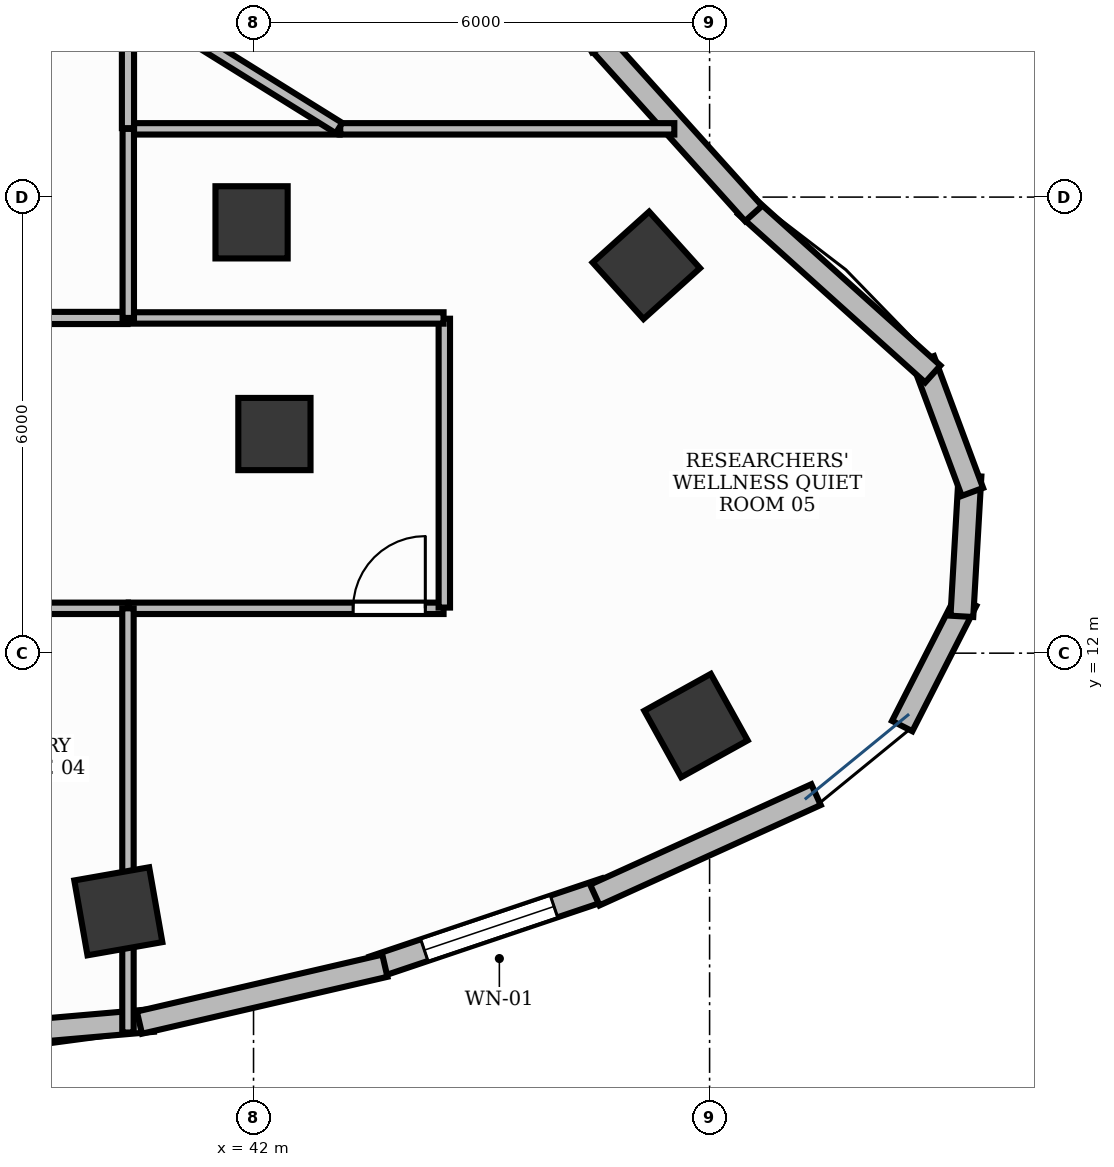
"""IFC4 building model, lengths in metres.
Left out: names, types, materials, properties, quantities, classifications, styles, units other than length and angle.
Written with IfcOpenShell. Run it as: python <this file> out.ifc"""

import sys

from ifc_helpers import new_model, si_unit, direction, frame, frame_2d, origin, origin_2d, place, context, subcontext, project, spatial, rectangle, extrude, element, fill, save


model = new_model("IFC4")
c1 = context("Model", 3, precision=1e-05, world=origin(), true_north=direction((0.0, 1.0)))
c2 = subcontext(c1, "Body", "Model", "MODEL_VIEW")
j1 = project(units=[si_unit("LENGTHUNIT", "METRE"), si_unit("PLANEANGLEUNIT", "RADIAN")], contexts=[c1])
p1 = place(None, origin())
s1 = spatial("IfcSite", under=j1, at=p1, CompositionType="ELEMENT")
p2 = place(p1, origin())
s2 = spatial("IfcBuilding", under=s1, at=p2, CompositionType="ELEMENT")
p3 = place(p2, frame((0.0, 0.0, 196.2)))
s3 = spatial("IfcBuildingStorey", under=s2, at=p3, CompositionType="ELEMENT", Elevation=196.2)
for number, where, z_axis, x_axis in (
    (1, (40.221, 8.604, -0.0), (0.0, 0.0, 1.0), (0.985, 0.173, 0.0)),
    (2, (47.821, 11.047, -0.0), (0.0, 0.0, 1.0), (0.875, 0.485, 0.0)),
):
    element("IfcColumn", number, at=place(p3, frame(where, z_axis=z_axis, x_axis=x_axis)), inside=s3, PredefinedType="COLUMN", context=c2, shape_type="SweptSolid", body=[
        extrude(rectangle(XDim=1.0, YDim=1.0, at=origin_2d()), origin(), (0.0, 0.0, 1.0), 3.901),
    ])
p4 = place(p3, frame((42.275, 14.883, -0.0), z_axis=(0.0, 0.0, 1.0), x_axis=(1.0, 0.0, 0.0)))
e3 = element("IfcColumn", 3, at=p4, inside=s3, PredefinedType="COLUMN", context=c2, shape_type="SweptSolid", body=[
    extrude(rectangle(XDim=0.95, YDim=0.95, at=origin_2d()), origin(), (0.0, 0.0, 1.0), 3.901),
])
p5 = place(p3, frame((47.167, 17.102, -0.0), z_axis=(0.0, 0.0, 1.0), x_axis=(-0.669130606359, 0.743144825477, 0.0)))
e4 = element("IfcColumn", 4, at=p5, inside=s3, PredefinedType="COLUMN", context=c2, shape_type="SweptSolid", body=[
    extrude(rectangle(XDim=1.0, YDim=1.0, at=origin_2d()), origin(), (0.0, 0.0, 1.0), 3.901),
])
p6 = place(p3, frame((41.974, 17.668, -0.0), z_axis=(0.0, 0.0, 1.0), x_axis=(1.0, 0.0, 0.0)))
e5 = element("IfcColumn", 5, at=p6, inside=s3, PredefinedType="COLUMN", context=c2, shape_type="SweptSolid", body=[
    extrude(rectangle(XDim=0.95, YDim=0.95, at=origin_2d()), origin(), (0.0, 0.0, 1.0), 3.901),
])
p7 = place(p3, frame((43.573, 7.866, 0.0), z_axis=(0.0, 0.0, 1.0), x_axis=(0.947663163736, 0.319271871761, 0.0)))
e6 = element("IfcWall", 6, at=p7, inside=s3, PredefinedType="STANDARD", context=c2, shape_type="SweptSolid", body=[
    extrude(rectangle(XDim=3.222, YDim=0.3, at=frame_2d((1.611, 0.0))), origin(), (0.0, 0.0, 1.0), 3.9),
])
p8 = place(p7, frame((0.711, 0.0, 0.9)))
e7 = element("IfcOpeningElement", 7, at=p8, cuts=e6, PredefinedType="OPENING", context=c2, shape_type="SweptSolid", body=[
    extrude(rectangle(XDim=1.8, YDim=2.1, at=frame_2d((0.9, 1.05))), frame((0.0, 0.165, 0.0), z_axis=(0.0, -1.0, 0.0), x_axis=(1.0, 0.0, 0.0)), (0.0, 0.0, 1.0), 0.33),
])
p9 = place(p3, frame((34.149, 6.601, 0.0), z_axis=(0.0, 0.0, 1.0), x_axis=(0.996255675021, 0.086455942472, 0.0)))
e8 = element("IfcWall", 8, at=p9, inside=s3, PredefinedType="STANDARD", context=c2, shape_type="SweptSolid", body=[
    extrude(rectangle(XDim=6.551, YDim=0.3, at=frame_2d((3.276, 0.0))), origin(), (0.0, 0.0, 1.0), 3.9),
])
p10 = place(p3, frame((40.499, 7.14, 0.0), z_axis=(0.0, 0.0, 1.0), x_axis=(0.974179712493, 0.225773974956, 0.0)))
e9 = element("IfcWall", 9, at=p10, inside=s3, PredefinedType="STANDARD", context=c2, shape_type="SweptSolid", body=[
    extrude(rectangle(XDim=3.314, YDim=0.3, at=frame_2d((1.657, 0.0))), origin(), (0.0, 0.0, 1.0), 3.9),
])
p11 = place(p3, frame((46.49, 8.818, 0.0), z_axis=(0.0, 0.0, 1.0), x_axis=(0.910633193525, 0.413215666268, 0.0)))
e10 = element("IfcWall", 10, at=p11, inside=s3, PredefinedType="STANDARD", context=c2, shape_type="SweptSolid", body=[
    extrude(rectangle(XDim=3.195, YDim=0.3, at=frame_2d((1.598, 0.0))), origin(), (0.0, 0.0, 1.0), 3.9),
])
for number, where, z_axis, x_axis in (
    (11, (50.534, 11.041, 0.0), (0.0, 0.0, 1.0), (0.454, 0.891, 0.0)),
    (12, (51.319, 12.484, 0.0), (0.0, 0.0, 1.0), (0.057, 0.998, 0.0)),
    (13, (51.458, 14.121, 0.0), (0.0, 0.0, 1.0), (-0.349, 0.937, 0.0)),
):
    element("IfcWall", number, at=place(p3, frame(where, z_axis=z_axis, x_axis=x_axis)), inside=s3, PredefinedType="STANDARD", context=c2, shape_type="SweptSolid", body=[
        extrude(rectangle(XDim=1.852, YDim=0.3, at=frame_2d((0.926, 0.0))), origin(), (0.0, 0.0, 1.0), 3.9),
    ])
p12 = place(p3, frame((50.936, 15.673, 0.0), z_axis=(0.0, 0.0, 1.0), x_axis=(-0.743341827472, 0.668911748687, 0.0)))
e14 = element("IfcWall", 14, at=p12, inside=s3, PredefinedType="STANDARD", context=c2, shape_type="SweptSolid", body=[
    extrude(rectangle(XDim=3.31, YDim=0.3, at=frame_2d((1.655, 0.0))), origin(), (0.0, 0.0, 1.0), 3.9),
])
p13 = place(p3, frame((48.579, 17.784, 0.0), z_axis=(0.0, 0.0, 1.0), x_axis=(-0.669165704933, 0.743113221079, 0.0)))
e15 = element("IfcWall", 15, at=p13, inside=s3, PredefinedType="STANDARD", context=c2, shape_type="SweptSolid", body=[
    extrude(rectangle(XDim=3.087, YDim=0.3, at=frame_2d((1.543, 0.0))), origin(), (0.0, 0.0, 1.0), 3.9),
])
p14 = place(p3, frame((35.98, 12.59, 0.0), z_axis=(0.0, 0.0, 1.0), x_axis=(1.0, 0.0, 0.0)))
e16 = element("IfcWall", 16, at=p14, inside=s3, PredefinedType="PARTITIONING", context=c2, shape_type="SweptSolid", body=[
    extrude(rectangle(XDim=4.368, YDim=0.15, at=frame_2d((2.184, 0.0))), origin(), (0.0, 0.0, 1.0), 2.22),
])
p15 = place(p14, frame((0.508, 0.0, 0.0)))
e17 = element("IfcOpeningElement", 17, at=p15, cuts=e16, PredefinedType="OPENING", context=c2, shape_type="SweptSolid", body=[
    extrude(rectangle(XDim=0.95, YDim=2.15, at=frame_2d((0.475, 1.075))), frame((0.0, 0.09, 0.0), z_axis=(0.0, -1.0, 0.0), x_axis=(1.0, 0.0, 0.0)), (0.0, 0.0, 1.0), 0.18),
])
p16 = place(p3, frame((40.358, 12.59, 0.0), z_axis=(0.0, 0.0, 1.0), x_axis=(1.0, 0.0, 0.0)))
e18 = element("IfcWall", 18, at=p16, inside=s3, PredefinedType="PARTITIONING", context=c2, shape_type="SweptSolid", body=[
    extrude(rectangle(XDim=4.142, YDim=0.15, at=frame_2d((2.071, 0.0))), origin(), (0.0, 0.0, 1.0), 2.22),
])
p17 = place(p16, frame((2.952, 0.0, 0.0)))
e19 = element("IfcOpeningElement", 19, at=p17, cuts=e18, PredefinedType="OPENING", context=c2, shape_type="SweptSolid", body=[
    extrude(rectangle(XDim=0.95, YDim=2.15, at=frame_2d((0.475, 1.075))), frame((0.0, 0.09, 0.0), z_axis=(0.0, -1.0, 0.0), x_axis=(1.0, 0.0, 0.0)), (0.0, 0.0, 1.0), 0.18),
])
p18 = place(p3, frame((40.342, 16.41, 0.0), z_axis=(0.0, 0.0, 1.0), x_axis=(-1.0, 0.0, 0.0)))
e20 = element("IfcWall", 20, at=p18, inside=s3, PredefinedType="PARTITIONING", context=c2, shape_type="SweptSolid", body=[
    extrude(rectangle(XDim=11.342, YDim=0.16, at=frame_2d((5.671, 0.0))), origin(), (0.0, 0.0, 1.0), 2.22),
])
p19 = place(p18, frame((6.14, 0.0, 0.0)))
e21 = element("IfcOpeningElement", 21, at=p19, cuts=e20, PredefinedType="OPENING", context=c2, shape_type="SweptSolid", body=[
    extrude(rectangle(XDim=0.95, YDim=2.15, at=frame_2d((0.475, 1.075))), frame((0.0, 0.095, 0.0), z_axis=(0.0, -1.0, 0.0), x_axis=(1.0, 0.0, 0.0)), (0.0, 0.0, 1.0), 0.19),
])
p20 = place(p3, frame((40.348, 12.59, 0.0), z_axis=(0.0, 0.0, 1.0), x_axis=(0.0, -1.0, 0.0)))
e22 = element("IfcWall", 22, at=p20, inside=s3, PredefinedType="PARTITIONING", context=c2, shape_type="SweptSolid", body=[
    extrude(rectangle(XDim=5.581, YDim=0.15, at=frame_2d((2.791, 0.0))), origin(), (0.0, 0.0, 1.0), 2.22),
])
p21 = place(p3, frame((40.352, 18.898, 0.0), z_axis=(0.0, 0.0, 1.0), x_axis=(1.0, 0.0, 0.0)))
e23 = element("IfcWall", 23, at=p21, inside=s3, PredefinedType="PARTITIONING", context=c2, shape_type="SweptSolid", body=[
    extrude(rectangle(XDim=2.781, YDim=0.15, at=frame_2d((1.39, 0.0))), origin(), (0.0, 0.0, 1.0), 2.22),
])
p22 = place(p3, frame((43.141, 18.898, 0.0), z_axis=(0.0, 0.0, 1.0), x_axis=(1.0, 0.0, 0.0)))
e24 = element("IfcWall", 24, at=p22, inside=s3, PredefinedType="PARTITIONING", context=c2, shape_type="SweptSolid", body=[
    extrude(rectangle(XDim=4.395, YDim=0.15, at=frame_2d((2.198, 0.0))), origin(), (0.0, 0.0, 1.0), 2.22),
])
p23 = place(p3, frame((44.51, 12.6, 0.0), z_axis=(0.0, 0.0, 1.0), x_axis=(0.0, 1.0, 0.0)))
e25 = element("IfcWall", 25, at=p23, inside=s3, PredefinedType="PARTITIONING", context=c2, shape_type="SweptSolid", body=[
    extrude(rectangle(XDim=3.8, YDim=0.15, at=frame_2d((1.9, 0.0))), origin(), (0.0, 0.0, 1.0), 2.22),
])
p24 = place(p3, frame((44.5, 16.41, 0.0), z_axis=(0.0, 0.0, 1.0), x_axis=(-1.0, 0.0, 0.0)))
e26 = element("IfcWall", 26, at=p24, inside=s3, PredefinedType="PARTITIONING", context=c2, shape_type="SweptSolid", body=[
    extrude(rectangle(XDim=4.148, YDim=0.15, at=frame_2d((2.074, 0.0))), origin(), (0.0, 0.0, 1.0), 2.22),
])
p25 = place(p3, frame((40.352, 16.41, 0.0), z_axis=(0.0, 0.0, 1.0), x_axis=(0.0, 1.0, 0.0)))
e27 = element("IfcWall", 27, at=p25, inside=s3, PredefinedType="PARTITIONING", context=c2, shape_type="SweptSolid", body=[
    extrude(rectangle(XDim=2.488, YDim=0.15, at=frame_2d((1.244, 0.0))), origin(), (0.0, 0.0, 1.0), 2.22),
])
p26 = place(p3, frame((43.125, 18.908, 0.0), z_axis=(0.0, 0.0, 1.0), x_axis=(-0.848988734201, 0.528410947274, 0.0)))
e28 = element("IfcWall", 28, at=p26, inside=s3, PredefinedType="PARTITIONING", context=c2, shape_type="SweptSolid", body=[
    extrude(rectangle(XDim=3.263, YDim=0.16, at=frame_2d((1.632, 0.0))), origin(), (0.0, 0.0, 1.0), 2.22),
])
p27 = place(p3, frame((40.348, 20.629, 0.0), z_axis=(0.0, 0.0, 1.0), x_axis=(0.0, -1.0, 0.0)))
e29 = element("IfcWall", 29, at=p27, inside=s3, PredefinedType="PARTITIONING", context=c2, shape_type="SweptSolid", body=[
    extrude(rectangle(XDim=1.722, YDim=0.16, at=frame_2d((0.861, 0.0))), origin(), (0.0, 0.0, 1.0), 2.22),
])
p28 = place(p8, origin())
e30 = element("IfcWindow", 30, at=p28, inside=s3, PartitioningType="SINGLE_PANEL", PredefinedType="WINDOW", context=c2, shape_type="SweptSolid", body=[
    extrude(rectangle(XDim=1.8, YDim=2.1, at=frame_2d((0.9, 1.05))), frame((0.0, 0.03, 0.0), z_axis=(0.0, -1.0, 0.0), x_axis=(1.0, 0.0, 0.0)), (0.0, 0.0, 1.0), 0.06),
])
fill(e7, e30)
p29 = place(p17, origin())
e31 = element("IfcDoor", 31, at=p29, inside=s3, OperationType="SINGLE_SWING_RIGHT", PredefinedType="DOOR", context=c2, shape_type="SweptSolid", body=[
    extrude(rectangle(XDim=0.95, YDim=2.15, at=frame_2d((0.475, 1.075))), frame((0.0, 0.025, 0.0), z_axis=(0.0, -1.0, 0.0), x_axis=(1.0, 0.0, 0.0)), (0.0, 0.0, 1.0), 0.05),
])
fill(e19, e31)
save(model, sys.argv[1])
